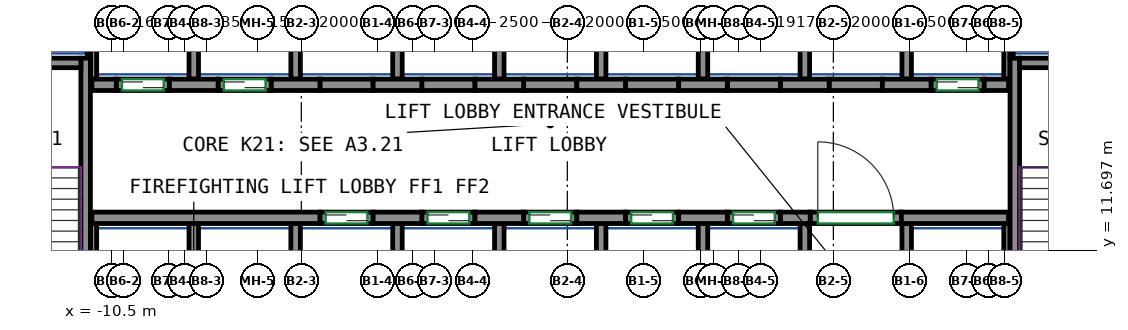
"""IFC4 building model, lengths in metres.
Left out: names, types, materials, properties, quantities, classifications, styles, units other than length and angle.
Written with IfcOpenShell. Run it as: python <this file> out.ifc"""

import sys

from ifc_helpers import new_model, si_unit, direction, frame, frame_2d, origin, place, context, subcontext, project, spatial, rectangle, extrude, source, transform, mapped, element, fill, save


model = new_model("IFC4")
c1 = context("Model", 3, precision=1e-05, world=origin(), true_north=direction((0.0, 1.0)))
c2 = subcontext(c1, "Body", "Model", "MODEL_VIEW")
j1 = project(units=[si_unit("LENGTHUNIT", "METRE"), si_unit("PLANEANGLEUNIT", "RADIAN")], contexts=[c1])
p1 = place(None, origin())
s1 = spatial("IfcSite", under=j1, at=p1, CompositionType="ELEMENT")
p2 = place(p1, origin())
s2 = spatial("IfcBuilding", under=s1, at=p2, CompositionType="ELEMENT")
p3 = place(p2, frame((0.0, 0.0, 87.2)))
s3 = spatial("IfcBuildingStorey", under=s2, at=p3, CompositionType="ELEMENT", Elevation=87.2)
m1 = source(origin(), c2, "Body", "SweptSolid", [
    extrude(rectangle(XDim=7.75, YDim=0.25, at=frame_2d((3.875, 0.0))), origin(), (0.0, 0.0, 1.0), 3.72),
])
p4 = place(p3, frame((-11.175, 9.0, 0.0), z_axis=(0.0, 0.0, 1.0), x_axis=(0.0, 1.0, 0.0)))
e1 = element("IfcWall", 1, at=p4, inside=s3, PredefinedType="SHEAR", context=c2, shape_type="MappedRepresentation", body=[
    mapped(m1, transform((0.0, 0.0, 0.0))),
])
m2 = source(origin(), c2, "Body", "SweptSolid", [
    extrude(rectangle(XDim=3.7, YDim=0.25, at=frame_2d((1.85, 0.0))), origin(), (0.0, 0.0, 1.0), 3.72),
])
p5 = place(p3, frame((-15.0, 16.625, 0.0), z_axis=(0.0, 0.0, 1.0), x_axis=(1.0, 0.0, 0.0)))
e2 = element("IfcWall", 2, at=p5, inside=s3, PredefinedType="SHEAR", context=c2, shape_type="MappedRepresentation", body=[
    mapped(m2, transform((0.0, 0.0, 0.0))),
])
p6 = place(p3, frame((13.275, 9.0, 0.0), z_axis=(0.0, 0.0, 1.0), x_axis=(0.0, 1.0, 0.0)))
e3 = element("IfcWall", 3, at=p6, inside=s3, PredefinedType="SHEAR", context=c2, shape_type="MappedRepresentation", body=[
    mapped(m1, transform((0.0, 0.0, 0.0))),
])
m3 = source(origin(), c2, "Body", "SweptSolid", [
    extrude(rectangle(XDim=3.7, YDim=0.25, at=frame_2d((1.85, 0.0))), origin(), (0.0, 0.0, 1.0), 3.72),
])
p7 = place(p3, frame((13.4, 16.625, 0.0), z_axis=(0.0, 0.0, 1.0), x_axis=(1.0, 0.0, 0.0)))
e4 = element("IfcWall", 4, at=p7, inside=s3, PredefinedType="SHEAR", context=c2, shape_type="MappedRepresentation", body=[
    mapped(m3, transform((0.0, 0.0, 0.0))),
])
m4 = source(origin(), c2, "Body", "SweptSolid", [
    extrude(rectangle(XDim=6.0, YDim=0.3, at=frame_2d((3.0, 0.0))), origin(), (0.0, 0.0, 1.0), 3.72),
])
p8 = place(p3, frame((-11.01, 12.55, 0.0), z_axis=(0.0, 0.0, 1.0), x_axis=(1.0, 0.0, 0.0)))
e5 = element("IfcWall", 5, at=p8, inside=s3, PredefinedType="SHEAR", context=c2, shape_type="MappedRepresentation", body=[
    mapped(m4, transform((0.0, 0.0, 0.0))),
])
m5 = source(origin(), c2, "Body", "SweptSolid", [
    extrude(rectangle(XDim=1.28, YDim=0.3, at=frame_2d((0.64, 0.0))), origin(), (0.0, 0.0, 1.0), 3.72),
])
for number, where, z_axis, x_axis in (
    (6, (-3.61, 12.55, 0.0), (0.0, 0.0, 1.0), (1.0, 0.0, 0.0)),
    (7, (-0.93, 12.55, 0.0), (0.0, 0.0, 1.0), (1.0, 0.0, 0.0)),
    (8, (1.75, 12.55, 0.0), (0.0, 0.0, 1.0), (1.0, 0.0, 0.0)),
    (9, (4.43, 12.55, 0.0), (0.0, 0.0, 1.0), (1.0, 0.0, 0.0)),
):
    element("IfcWall", number, at=place(p3, frame(where, z_axis=z_axis, x_axis=x_axis)), inside=s3, PredefinedType="SHEAR", context=c2, shape_type="MappedRepresentation", body=[
        mapped(m5, transform((0.0, 0.0, 0.0))),
    ])
m6 = source(origin(), c2, "Body", "SweptSolid", [
    extrude(rectangle(XDim=0.78, YDim=0.3, at=frame_2d((0.39, 0.0))), origin(), (0.0, 0.0, 1.0), 3.72),
])
p9 = place(p3, frame((7.11, 12.55, 0.0), z_axis=(0.0, 0.0, 1.0), x_axis=(1.0, 0.0, 0.0)))
e10 = element("IfcWall", 10, at=p9, inside=s3, PredefinedType="SHEAR", context=c2, shape_type="MappedRepresentation", body=[
    mapped(m6, transform((0.0, 0.0, 0.0))),
])
m7 = source(origin(), c2, "Body", "SweptSolid", [
    extrude(rectangle(XDim=2.82, YDim=0.3, at=frame_2d((1.41, 0.0))), origin(), (0.0, 0.0, 1.0), 3.72),
])
p10 = place(p3, frame((10.29, 12.55, 0.0), z_axis=(0.0, 0.0, 1.0), x_axis=(1.0, 0.0, 0.0)))
e11 = element("IfcWall", 11, at=p10, inside=s3, PredefinedType="SHEAR", context=c2, shape_type="MappedRepresentation", body=[
    mapped(m7, transform((0.0, 0.0, 0.0))),
])
m8 = source(origin(), c2, "Body", "SweptSolid", [
    extrude(rectangle(XDim=0.64, YDim=0.3, at=frame_2d((0.32, 0.0))), origin(), (0.0, 0.0, 1.0), 3.72),
])
p11 = place(p3, frame((-11.01, 16.05, 0.0), z_axis=(0.0, 0.0, 1.0), x_axis=(1.0, 0.0, 0.0)))
e12 = element("IfcWall", 12, at=p11, inside=s3, PredefinedType="SHEAR", context=c2, shape_type="MappedRepresentation", body=[
    mapped(m8, transform((0.0, 0.0, 0.0))),
])
for number, where, z_axis, x_axis in (
    (13, (-8.97, 16.05, 0.0), (0.0, 0.0, 1.0), (1.0, 0.0, 0.0)),
    (14, (-6.29, 16.05, 0.0), (0.0, 0.0, 1.0), (1.0, 0.0, 0.0)),
    (15, (-3.61, 16.05, 0.0), (0.0, 0.0, 1.0), (1.0, 0.0, 0.0)),
    (16, (-0.93, 16.05, 0.0), (0.0, 0.0, 1.0), (1.0, 0.0, 0.0)),
    (17, (1.75, 16.05, 0.0), (0.0, 0.0, 1.0), (1.0, 0.0, 0.0)),
    (18, (4.43, 16.05, 0.0), (0.0, 0.0, 1.0), (1.0, 0.0, 0.0)),
):
    element("IfcWall", number, at=place(p3, frame(where, z_axis=z_axis, x_axis=x_axis)), inside=s3, PredefinedType="SHEAR", context=c2, shape_type="MappedRepresentation", body=[
        mapped(m5, transform((0.0, 0.0, 0.0))),
    ])
m9 = source(origin(), c2, "Body", "SweptSolid", [
    extrude(rectangle(XDim=1.28, YDim=0.3, at=frame_2d((0.64, 0.0))), origin(), (0.0, 0.0, 1.0), 3.72),
])
p12 = place(p3, frame((7.11, 16.05, 0.0), z_axis=(0.0, 0.0, 1.0), x_axis=(1.0, 0.0, 0.0)))
e19 = element("IfcWall", 19, at=p12, inside=s3, PredefinedType="SHEAR", context=c2, shape_type="MappedRepresentation", body=[
    mapped(m9, transform((0.0, 0.0, 0.0))),
])
p13 = place(p3, frame((9.79, 16.05, 0.0), z_axis=(0.0, 0.0, 1.0), x_axis=(1.0, 0.0, 0.0)))
e20 = element("IfcWall", 20, at=p13, inside=s3, PredefinedType="SHEAR", context=c2, shape_type="MappedRepresentation", body=[
    mapped(m5, transform((0.0, 0.0, 0.0))),
])
m10 = source(origin(), c2, "Body", "SweptSolid", [
    extrude(rectangle(XDim=0.64, YDim=0.3, at=frame_2d((0.32, 0.0))), origin(), (0.0, 0.0, 1.0), 3.72),
])
p14 = place(p3, frame((12.47, 16.05, 0.0), z_axis=(0.0, 0.0, 1.0), x_axis=(1.0, 0.0, 0.0)))
e21 = element("IfcWall", 21, at=p14, inside=s3, PredefinedType="SHEAR", context=c2, shape_type="MappedRepresentation", body=[
    mapped(m10, transform((0.0, 0.0, 0.0))),
])
m11 = source(origin(), c2, "Body", "SweptSolid", [
    extrude(rectangle(XDim=1.4, YDim=0.3, at=frame_2d((0.7, 0.0))), origin(), (0.0, 0.0, 1.0), 3.72),
])
p15 = place(p3, frame((-5.01, 12.55, 0.0), z_axis=(0.0, 0.0, 1.0), x_axis=(1.0, 0.0, 0.0)))
e22 = element("IfcWall", 22, at=p15, inside=s3, PredefinedType="PARTITIONING", context=c2, shape_type="MappedRepresentation", body=[
    mapped(m11, transform((0.0, 0.0, 0.0))),
])
p16 = place(p15, frame((0.15, 0.0, 0.0)))
e23 = element("IfcOpeningElement", 23, at=p16, cuts=e22, PredefinedType="OPENING", context=c2, shape_type="SweptSolid", body=[
    extrude(rectangle(XDim=1.1, YDim=2.1, at=frame_2d((0.55, 1.05))), frame((0.0, 0.16, 0.0), z_axis=(0.0, -1.0, 0.0), x_axis=(1.0, 0.0, 0.0)), (0.0, 0.0, 1.0), 0.32),
])
m12 = source(origin(), c2, "Body", "SweptSolid", [
    extrude(rectangle(XDim=1.4, YDim=0.3, at=frame_2d((0.7, 0.0))), origin(), (0.0, 0.0, 1.0), 3.72),
])
p17 = place(p3, frame((-2.33, 12.55, 0.0), z_axis=(0.0, 0.0, 1.0), x_axis=(1.0, 0.0, 0.0)))
e24 = element("IfcWall", 24, at=p17, inside=s3, PredefinedType="PARTITIONING", context=c2, shape_type="MappedRepresentation", body=[
    mapped(m12, transform((0.0, 0.0, 0.0))),
])
p18 = place(p17, frame((0.15, 0.0, 0.0)))
e25 = element("IfcOpeningElement", 25, at=p18, cuts=e24, PredefinedType="OPENING", context=c2, shape_type="SweptSolid", body=[
    extrude(rectangle(XDim=1.1, YDim=2.1, at=frame_2d((0.55, 1.05))), frame((0.0, 0.16, 0.0), z_axis=(0.0, -1.0, 0.0), x_axis=(1.0, 0.0, 0.0)), (0.0, 0.0, 1.0), 0.32),
])
p19 = place(p3, frame((0.35, 12.55, 0.0), z_axis=(0.0, 0.0, 1.0), x_axis=(1.0, 0.0, 0.0)))
e26 = element("IfcWall", 26, at=p19, inside=s3, PredefinedType="PARTITIONING", context=c2, shape_type="MappedRepresentation", body=[
    mapped(m11, transform((0.0, 0.0, 0.0))),
])
p20 = place(p19, frame((0.15, 0.0, 0.0)))
e27 = element("IfcOpeningElement", 27, at=p20, cuts=e26, PredefinedType="OPENING", context=c2, shape_type="SweptSolid", body=[
    extrude(rectangle(XDim=1.1, YDim=2.1, at=frame_2d((0.55, 1.05))), frame((0.0, 0.16, 0.0), z_axis=(0.0, -1.0, 0.0), x_axis=(1.0, 0.0, 0.0)), (0.0, 0.0, 1.0), 0.32),
])
p21 = place(p3, frame((3.03, 12.55, 0.0), z_axis=(0.0, 0.0, 1.0), x_axis=(1.0, 0.0, 0.0)))
e28 = element("IfcWall", 28, at=p21, inside=s3, PredefinedType="PARTITIONING", context=c2, shape_type="MappedRepresentation", body=[
    mapped(m11, transform((0.0, 0.0, 0.0))),
])
p22 = place(p21, frame((0.15, 0.0, 0.0)))
e29 = element("IfcOpeningElement", 29, at=p22, cuts=e28, PredefinedType="OPENING", context=c2, shape_type="SweptSolid", body=[
    extrude(rectangle(XDim=1.1, YDim=2.1, at=frame_2d((0.55, 1.05))), frame((0.0, 0.16, 0.0), z_axis=(0.0, -1.0, 0.0), x_axis=(1.0, 0.0, 0.0)), (0.0, 0.0, 1.0), 0.32),
])
p23 = place(p3, frame((5.71, 12.55, 0.0), z_axis=(0.0, 0.0, 1.0), x_axis=(1.0, 0.0, 0.0)))
e30 = element("IfcWall", 30, at=p23, inside=s3, PredefinedType="PARTITIONING", context=c2, shape_type="MappedRepresentation", body=[
    mapped(m12, transform((0.0, 0.0, 0.0))),
])
p24 = place(p23, frame((0.15, 0.0, 0.0)))
e31 = element("IfcOpeningElement", 31, at=p24, cuts=e30, PredefinedType="OPENING", context=c2, shape_type="SweptSolid", body=[
    extrude(rectangle(XDim=1.1, YDim=2.1, at=frame_2d((0.55, 1.05))), frame((0.0, 0.16, 0.0), z_axis=(0.0, -1.0, 0.0), x_axis=(1.0, 0.0, 0.0)), (0.0, 0.0, 1.0), 0.32),
])
p25 = place(p3, frame((11.07, 16.05, 0.0), z_axis=(0.0, 0.0, 1.0), x_axis=(1.0, 0.0, 0.0)))
e32 = element("IfcWall", 32, at=p25, inside=s3, PredefinedType="PARTITIONING", context=c2, shape_type="MappedRepresentation", body=[
    mapped(m11, transform((0.0, 0.0, 0.0))),
])
p26 = place(p25, frame((0.15, 0.0, 0.0)))
e33 = element("IfcOpeningElement", 33, at=p26, cuts=e32, PredefinedType="OPENING", context=c2, shape_type="SweptSolid", body=[
    extrude(rectangle(XDim=1.1, YDim=2.1, at=frame_2d((0.55, 1.05))), frame((0.0, 0.16, 0.0), z_axis=(0.0, -1.0, 0.0), x_axis=(1.0, 0.0, 0.0)), (0.0, 0.0, 1.0), 0.32),
])
p27 = place(p3, frame((-10.37, 16.05, 0.0), z_axis=(0.0, 0.0, 1.0), x_axis=(1.0, 0.0, 0.0)))
e34 = element("IfcWall", 34, at=p27, inside=s3, PredefinedType="PARTITIONING", context=c2, shape_type="MappedRepresentation", body=[
    mapped(m12, transform((0.0, 0.0, 0.0))),
])
p28 = place(p27, frame((0.15, 0.0, 0.0)))
e35 = element("IfcOpeningElement", 35, at=p28, cuts=e34, PredefinedType="OPENING", context=c2, shape_type="SweptSolid", body=[
    extrude(rectangle(XDim=1.1, YDim=2.1, at=frame_2d((0.55, 1.05))), frame((0.0, 0.16, 0.0), z_axis=(0.0, -1.0, 0.0), x_axis=(1.0, 0.0, 0.0)), (0.0, 0.0, 1.0), 0.32),
])
p29 = place(p3, frame((-7.69, 16.05, 0.0), z_axis=(0.0, 0.0, 1.0), x_axis=(1.0, 0.0, 0.0)))
e36 = element("IfcWall", 36, at=p29, inside=s3, PredefinedType="PARTITIONING", context=c2, shape_type="MappedRepresentation", body=[
    mapped(m11, transform((0.0, 0.0, 0.0))),
])
p30 = place(p29, frame((0.15, 0.0, 0.0)))
e37 = element("IfcOpeningElement", 37, at=p30, cuts=e36, PredefinedType="OPENING", context=c2, shape_type="SweptSolid", body=[
    extrude(rectangle(XDim=1.1, YDim=2.1, at=frame_2d((0.55, 1.05))), frame((0.0, 0.16, 0.0), z_axis=(0.0, -1.0, 0.0), x_axis=(1.0, 0.0, 0.0)), (0.0, 0.0, 1.0), 0.32),
])
m13 = source(origin(), c2, "Body", "SweptSolid", [
    extrude(rectangle(XDim=2.4, YDim=0.3, at=frame_2d((1.2, 0.0))), origin(), (0.0, 0.0, 1.0), 3.72),
])
p31 = place(p3, frame((7.89, 12.55, 0.0), z_axis=(0.0, 0.0, 1.0), x_axis=(1.0, 0.0, 0.0)))
e38 = element("IfcWall", 38, at=p31, inside=s3, PredefinedType="PARTITIONING", context=c2, shape_type="MappedRepresentation", body=[
    mapped(m13, transform((0.0, 0.0, 0.0))),
])
p32 = place(p31, frame((0.2, 0.0, 0.0)))
e39 = element("IfcOpeningElement", 39, at=p32, cuts=e38, PredefinedType="OPENING", context=c2, shape_type="SweptSolid", body=[
    extrude(rectangle(XDim=2.0, YDim=2.1, at=frame_2d((1.0, 1.05))), frame((0.0, 0.16, 0.0), z_axis=(0.0, -1.0, 0.0), x_axis=(1.0, 0.0, 0.0)), (0.0, 0.0, 1.0), 0.32),
])
p33 = place(p3, frame((-5.01, 16.05, 0.0), z_axis=(0.0, 0.0, 1.0), x_axis=(1.0, 0.0, 0.0)))
e40 = element("IfcWall", 40, at=p33, inside=s3, PredefinedType="PARTITIONING", context=c2, shape_type="MappedRepresentation", body=[
    mapped(m11, transform((0.0, 0.0, 0.0))),
])
p34 = place(p3, frame((-2.33, 16.05, 0.0), z_axis=(0.0, 0.0, 1.0), x_axis=(1.0, 0.0, 0.0)))
e41 = element("IfcWall", 41, at=p34, inside=s3, PredefinedType="PARTITIONING", context=c2, shape_type="MappedRepresentation", body=[
    mapped(m12, transform((0.0, 0.0, 0.0))),
])
for number, where, z_axis, x_axis in (
    (42, (0.35, 16.05, 0.0), (0.0, 0.0, 1.0), (1.0, 0.0, 0.0)),
    (43, (3.03, 16.05, 0.0), (0.0, 0.0, 1.0), (1.0, 0.0, 0.0)),
):
    element("IfcWall", number, at=place(p3, frame(where, z_axis=z_axis, x_axis=x_axis)), inside=s3, PredefinedType="PARTITIONING", context=c2, shape_type="MappedRepresentation", body=[
        mapped(m11, transform((0.0, 0.0, 0.0))),
    ])
for number, where, z_axis, x_axis in (
    (44, (5.71, 16.05, 0.0), (0.0, 0.0, 1.0), (1.0, 0.0, 0.0)),
    (45, (8.39, 16.05, 0.0), (0.0, 0.0, 1.0), (1.0, 0.0, 0.0)),
):
    element("IfcWall", number, at=place(p3, frame(where, z_axis=z_axis, x_axis=x_axis)), inside=s3, PredefinedType="PARTITIONING", context=c2, shape_type="MappedRepresentation", body=[
        mapped(m12, transform((0.0, 0.0, 0.0))),
    ])
m14 = source(origin(), c2, "Body", "SweptSolid", [
    extrude(rectangle(XDim=3.275, YDim=0.165, at=frame_2d((1.638, 0.0))), origin(), (0.0, 0.0, 1.0), 3.72),
])
for number, where, z_axis, x_axis in (
    (46, (13.067, 16.2, 0.0), (0.0, 0.0, 1.0), (0.0, 1.0, 0.0)),
    (47, (-10.968, 16.2, 0.0), (0.0, 0.0, 1.0), (0.0, 1.0, 0.0)),
):
    element("IfcWall", number, at=place(p3, frame(where, z_axis=z_axis, x_axis=x_axis)), inside=s3, PredefinedType="PARTITIONING", context=c2, shape_type="MappedRepresentation", body=[
        mapped(m14, transform((0.0, 0.0, 0.0))),
    ])
m15 = source(origin(), c2, "Body", "SweptSolid", [
    extrude(rectangle(XDim=3.275, YDim=0.25, at=frame_2d((1.638, 0.0))), origin(), (0.0, 0.0, 1.0), 3.72),
])
p35 = place(p3, frame((10.43, 16.2, 0.0), z_axis=(0.0, 0.0, 1.0), x_axis=(0.0, 1.0, 0.0)))
e48 = element("IfcWall", 48, at=p35, inside=s3, PredefinedType="PARTITIONING", context=c2, shape_type="MappedRepresentation", body=[
    mapped(m15, transform((0.0, 0.0, 0.0))),
])
m16 = source(origin(), c2, "Body", "SweptSolid", [
    extrude(rectangle(XDim=2.725, YDim=0.085, at=frame_2d((1.363, 0.0))), origin(), (0.0, 0.0, 1.0), 3.72),
])
p36 = place(p3, frame((13.192, 16.75, 0.0), z_axis=(0.0, 0.0, 1.0), x_axis=(0.0, 1.0, 0.0)))
e49 = element("IfcWall", 49, at=p36, inside=s3, PredefinedType="PARTITIONING", context=c2, shape_type="MappedRepresentation", body=[
    mapped(m16, transform((0.0, 0.0, 0.0))),
])
for number, where, z_axis, x_axis in (
    (50, (2.39, 16.2, 0.0), (0.0, 0.0, 1.0), (0.0, 1.0, 0.0)),
    (51, (5.07, 16.2, 0.0), (0.0, 0.0, 1.0), (0.0, 1.0, 0.0)),
    (52, (7.75, 16.2, 0.0), (0.0, 0.0, 1.0), (0.0, 1.0, 0.0)),
    (53, (-0.29, 16.2, 0.0), (0.0, 0.0, 1.0), (0.0, 1.0, 0.0)),
):
    element("IfcWall", number, at=place(p3, frame(where, z_axis=z_axis, x_axis=x_axis)), inside=s3, PredefinedType="PARTITIONING", context=c2, shape_type="MappedRepresentation", body=[
        mapped(m15, transform((0.0, 0.0, 0.0))),
    ])
p37 = place(p3, frame((-11.093, 16.75, 0.0), z_axis=(0.0, 0.0, 1.0), x_axis=(0.0, 1.0, 0.0)))
e54 = element("IfcWall", 54, at=p37, inside=s3, PredefinedType="PARTITIONING", context=c2, shape_type="MappedRepresentation", body=[
    mapped(m16, transform((0.0, 0.0, 0.0))),
])
for number, where, z_axis, x_axis in (
    (55, (-2.97, 16.2, 0.0), (0.0, 0.0, 1.0), (0.0, 1.0, 0.0)),
    (56, (-5.65, 16.2, 0.0), (0.0, 0.0, 1.0), (0.0, 1.0, 0.0)),
    (57, (-8.33, 16.2, 0.0), (0.0, 0.0, 1.0), (0.0, 1.0, 0.0)),
):
    element("IfcWall", number, at=place(p3, frame(where, z_axis=z_axis, x_axis=x_axis)), inside=s3, PredefinedType="PARTITIONING", context=c2, shape_type="MappedRepresentation", body=[
        mapped(m15, transform((0.0, 0.0, 0.0))),
    ])
m17 = source(origin(), c2, "Body", "SweptSolid", [
    extrude(rectangle(XDim=3.4, YDim=0.25, at=frame_2d((1.7, 0.0))), origin(), (0.0, 0.0, 1.0), 3.72),
])
p38 = place(p3, frame((10.43, 9.0, 0.0), z_axis=(0.0, 0.0, 1.0), x_axis=(0.0, 1.0, 0.0)))
e58 = element("IfcWall", 58, at=p38, inside=s3, PredefinedType="PARTITIONING", context=c2, shape_type="MappedRepresentation", body=[
    mapped(m17, transform((0.0, 0.0, 0.0))),
])
m18 = source(origin(), c2, "Body", "SweptSolid", [
    extrude(rectangle(XDim=3.4, YDim=0.165, at=frame_2d((1.7, 0.0))), origin(), (0.0, 0.0, 1.0), 3.72),
])
p39 = place(p3, frame((13.067, 9.0, 0.0), z_axis=(0.0, 0.0, 1.0), x_axis=(0.0, 1.0, 0.0)))
e59 = element("IfcWall", 59, at=p39, inside=s3, PredefinedType="PARTITIONING", context=c2, shape_type="MappedRepresentation", body=[
    mapped(m18, transform((0.0, 0.0, 0.0))),
])
for number, where, z_axis, x_axis in (
    (60, (2.39, 9.0, 0.0), (0.0, 0.0, 1.0), (0.0, 1.0, 0.0)),
    (61, (5.07, 9.0, 0.0), (0.0, 0.0, 1.0), (0.0, 1.0, 0.0)),
    (62, (7.75, 9.0, 0.0), (0.0, 0.0, 1.0), (0.0, 1.0, 0.0)),
    (63, (-0.29, 9.0, 0.0), (0.0, 0.0, 1.0), (0.0, 1.0, 0.0)),
):
    element("IfcWall", number, at=place(p3, frame(where, z_axis=z_axis, x_axis=x_axis)), inside=s3, PredefinedType="PARTITIONING", context=c2, shape_type="MappedRepresentation", body=[
        mapped(m17, transform((0.0, 0.0, 0.0))),
    ])
p40 = place(p3, frame((-10.968, 9.0, 0.0), z_axis=(0.0, 0.0, 1.0), x_axis=(0.0, 1.0, 0.0)))
e64 = element("IfcWall", 64, at=p40, inside=s3, PredefinedType="PARTITIONING", context=c2, shape_type="MappedRepresentation", body=[
    mapped(m18, transform((0.0, 0.0, 0.0))),
])
for number, where, z_axis, x_axis in (
    (65, (-2.97, 9.0, 0.0), (0.0, 0.0, 1.0), (0.0, 1.0, 0.0)),
    (66, (-5.65, 9.0, 0.0), (0.0, 0.0, 1.0), (0.0, 1.0, 0.0)),
    (67, (-8.33, 9.0, 0.0), (0.0, 0.0, 1.0), (0.0, 1.0, 0.0)),
):
    element("IfcWall", number, at=place(p3, frame(where, z_axis=z_axis, x_axis=x_axis)), inside=s3, PredefinedType="PARTITIONING", context=c2, shape_type="MappedRepresentation", body=[
        mapped(m17, transform((0.0, 0.0, 0.0))),
    ])
p41 = place(p32, origin())
e68 = element("IfcDoor", 68, at=p41, inside=s3, OperationType="DOUBLE_DOOR_SINGLE_SWING", PredefinedType="DOOR", context=c2, shape_type="SweptSolid", body=[
    extrude(rectangle(XDim=2.0, YDim=2.1, at=frame_2d((1.0, 1.05))), frame((0.0, 0.025, 0.0), z_axis=(0.0, -1.0, 0.0), x_axis=(1.0, 0.0, 0.0)), (0.0, 0.0, 1.0), 0.05),
])
fill(e39, e68)
p42 = place(p16, origin())
e69 = element("IfcDoor", 69, at=p42, inside=s3, OperationType="DOUBLE_DOOR_SLIDING", PredefinedType="DOOR", context=c2, shape_type="SweptSolid", body=[
    extrude(rectangle(XDim=1.1, YDim=2.1, at=frame_2d((0.55, 1.05))), frame((0.0, 0.025, 0.0), z_axis=(0.0, -1.0, 0.0), x_axis=(1.0, 0.0, 0.0)), (0.0, 0.0, 1.0), 0.05),
])
fill(e23, e69)
p43 = place(p18, origin())
e70 = element("IfcDoor", 70, at=p43, inside=s3, OperationType="DOUBLE_DOOR_SLIDING", PredefinedType="DOOR", context=c2, shape_type="SweptSolid", body=[
    extrude(rectangle(XDim=1.1, YDim=2.1, at=frame_2d((0.55, 1.05))), frame((0.0, 0.025, 0.0), z_axis=(0.0, -1.0, 0.0), x_axis=(1.0, 0.0, 0.0)), (0.0, 0.0, 1.0), 0.05),
])
fill(e25, e70)
p44 = place(p20, origin())
e71 = element("IfcDoor", 71, at=p44, inside=s3, OperationType="DOUBLE_DOOR_SLIDING", PredefinedType="DOOR", context=c2, shape_type="SweptSolid", body=[
    extrude(rectangle(XDim=1.1, YDim=2.1, at=frame_2d((0.55, 1.05))), frame((0.0, 0.025, 0.0), z_axis=(0.0, -1.0, 0.0), x_axis=(1.0, 0.0, 0.0)), (0.0, 0.0, 1.0), 0.05),
])
fill(e27, e71)
p45 = place(p22, origin())
e72 = element("IfcDoor", 72, at=p45, inside=s3, OperationType="DOUBLE_DOOR_SLIDING", PredefinedType="DOOR", context=c2, shape_type="SweptSolid", body=[
    extrude(rectangle(XDim=1.1, YDim=2.1, at=frame_2d((0.55, 1.05))), frame((0.0, 0.025, 0.0), z_axis=(0.0, -1.0, 0.0), x_axis=(1.0, 0.0, 0.0)), (0.0, 0.0, 1.0), 0.05),
])
fill(e29, e72)
p46 = place(p24, origin())
e73 = element("IfcDoor", 73, at=p46, inside=s3, OperationType="DOUBLE_DOOR_SLIDING", PredefinedType="DOOR", context=c2, shape_type="SweptSolid", body=[
    extrude(rectangle(XDim=1.1, YDim=2.1, at=frame_2d((0.55, 1.05))), frame((0.0, 0.025, 0.0), z_axis=(0.0, -1.0, 0.0), x_axis=(1.0, 0.0, 0.0)), (0.0, 0.0, 1.0), 0.05),
])
fill(e31, e73)
p47 = place(p26, origin())
e74 = element("IfcDoor", 74, at=p47, inside=s3, OperationType="DOUBLE_DOOR_SLIDING", PredefinedType="DOOR", context=c2, shape_type="SweptSolid", body=[
    extrude(rectangle(XDim=1.1, YDim=2.1, at=frame_2d((0.55, 1.05))), frame((0.0, 0.025, 0.0), z_axis=(0.0, -1.0, 0.0), x_axis=(1.0, 0.0, 0.0)), (0.0, 0.0, 1.0), 0.05),
])
fill(e33, e74)
p48 = place(p28, origin())
e75 = element("IfcDoor", 75, at=p48, inside=s3, OperationType="DOUBLE_DOOR_SLIDING", PredefinedType="DOOR", context=c2, shape_type="SweptSolid", body=[
    extrude(rectangle(XDim=1.1, YDim=2.1, at=frame_2d((0.55, 1.05))), frame((0.0, 0.025, 0.0), z_axis=(0.0, -1.0, 0.0), x_axis=(1.0, 0.0, 0.0)), (0.0, 0.0, 1.0), 0.05),
])
fill(e35, e75)
p49 = place(p30, origin())
e76 = element("IfcDoor", 76, at=p49, inside=s3, OperationType="DOUBLE_DOOR_SLIDING", PredefinedType="DOOR", context=c2, shape_type="SweptSolid", body=[
    extrude(rectangle(XDim=1.1, YDim=2.1, at=frame_2d((0.55, 1.05))), frame((0.0, 0.025, 0.0), z_axis=(0.0, -1.0, 0.0), x_axis=(1.0, 0.0, 0.0)), (0.0, 0.0, 1.0), 0.05),
])
fill(e37, e76)
save(model, sys.argv[1])
